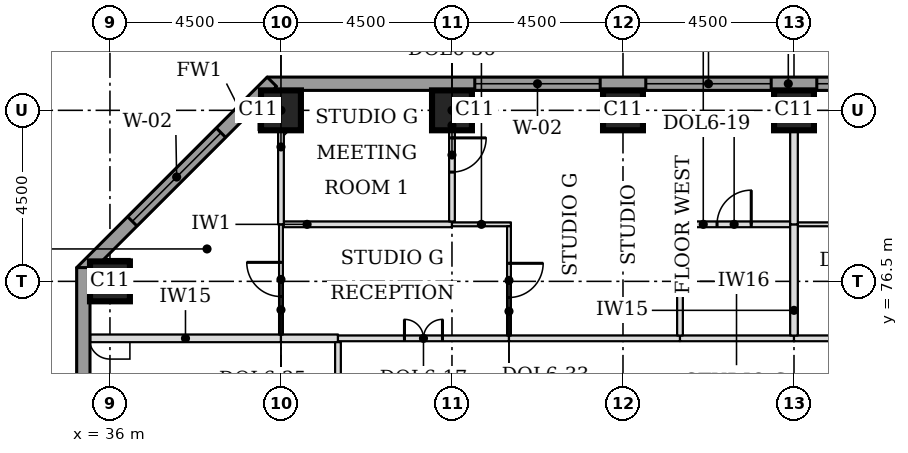
"""IFC4 building model, lengths in metres.
Left out: names, types, materials, properties, quantities, classifications, styles, units other than length and angle.
Written with IfcOpenShell. Run it as: python <this file> out.ifc"""

import sys

from ifc_helpers import new_model, si_unit, direction, frame, frame_2d, origin, origin_2d, place, context, subcontext, project, spatial, rectangle, extrude, element, fill, save


model = new_model("IFC4")
c1 = context("Model", 3, precision=1e-05, world=origin(), true_north=direction((0.0, 1.0)))
c2 = subcontext(c1, "Body", "Model", "MODEL_VIEW")
j1 = project(units=[si_unit("LENGTHUNIT", "METRE"), si_unit("PLANEANGLEUNIT", "RADIAN")], contexts=[c1])
p1 = place(None, origin())
s1 = spatial("IfcSite", under=j1, at=p1, CompositionType="ELEMENT")
p2 = place(p1, origin())
s2 = spatial("IfcBuilding", under=s1, at=p2, CompositionType="ELEMENT")
p3 = place(p2, frame((0.0, 0.0, 115.9)))
s3 = spatial("IfcBuildingStorey", under=s2, at=p3, CompositionType="ELEMENT", Elevation=115.9)
for number, where, z_axis, x_axis in (
    (1, (36.0, 76.5, 0.0), (0.0, 0.0, 1.0), (1.0, 0.0, 0.0)),
    (2, (40.5, 81.0, 0.0), (0.0, 0.0, 1.0), (1.0, 0.0, 0.0)),
    (3, (45.0, 81.0, 0.0), (0.0, 0.0, 1.0), (1.0, 0.0, 0.0)),
    (4, (49.5, 81.0, 0.0), (0.0, 0.0, 1.0), (1.0, 0.0, 0.0)),
    (5, (54.0, 81.0, 0.0), (0.0, 0.0, 1.0), (1.0, 0.0, 0.0)),
):
    element("IfcColumn", number, at=place(p3, frame(where, z_axis=z_axis, x_axis=x_axis)), inside=s3, PredefinedType="COLUMN", context=c2, shape_type="SweptSolid", body=[
        extrude(rectangle(XDim=1.05, YDim=1.05, at=origin_2d()), origin(), (0.0, 0.0, 1.0), 3.7),
    ])
p4 = place(p3, frame((72.362, 81.7, 0.0), z_axis=(0.0, 0.0, 1.0), x_axis=(-1.0, 0.0, 0.0)))
e6 = element("IfcWall", 6, at=p4, inside=s3, PredefinedType="STANDARD", context=c2, shape_type="SweptSolid", body=[
    extrude(rectangle(XDim=32.225, YDim=0.35, at=frame_2d((16.112, 0.0))), origin(), (0.0, 0.0, 1.0), 3.525),
])
p5 = place(p4, frame((5.462, 0.0, 0.9)))
e7 = element("IfcOpeningElement", 7, at=p5, cuts=e6, PredefinedType="OPENING", context=c2, shape_type="SweptSolid", body=[
    extrude(rectangle(XDim=3.3, YDim=1.9, at=frame_2d((1.65, 0.95))), frame((0.0, 0.185, 0.0), z_axis=(0.0, -1.0, 0.0), x_axis=(1.0, 0.0, 0.0)), (0.0, 0.0, 1.0), 0.37),
])
p6 = place(p4, frame((9.962, 0.0, 0.9)))
e8 = element("IfcOpeningElement", 8, at=p6, cuts=e6, PredefinedType="OPENING", context=c2, shape_type="SweptSolid", body=[
    extrude(rectangle(XDim=3.3, YDim=1.9, at=frame_2d((1.65, 0.95))), frame((0.0, 0.185, 0.0), z_axis=(0.0, -1.0, 0.0), x_axis=(1.0, 0.0, 0.0)), (0.0, 0.0, 1.0), 0.37),
])
p7 = place(p4, frame((14.462, 0.0, 0.9)))
e9 = element("IfcOpeningElement", 9, at=p7, cuts=e6, PredefinedType="OPENING", context=c2, shape_type="SweptSolid", body=[
    extrude(rectangle(XDim=3.3, YDim=1.9, at=frame_2d((1.65, 0.95))), frame((0.0, 0.185, 0.0), z_axis=(0.0, -1.0, 0.0), x_axis=(1.0, 0.0, 0.0)), (0.0, 0.0, 1.0), 0.37),
])
p8 = place(p4, frame((18.962, 0.0, 0.9)))
e10 = element("IfcOpeningElement", 10, at=p8, cuts=e6, PredefinedType="OPENING", context=c2, shape_type="SweptSolid", body=[
    extrude(rectangle(XDim=3.3, YDim=1.9, at=frame_2d((1.65, 0.95))), frame((0.0, 0.185, 0.0), z_axis=(0.0, -1.0, 0.0), x_axis=(1.0, 0.0, 0.0)), (0.0, 0.0, 1.0), 0.37),
])
p9 = place(p4, frame((23.462, 0.0, 0.9)))
e11 = element("IfcOpeningElement", 11, at=p9, cuts=e6, PredefinedType="OPENING", context=c2, shape_type="SweptSolid", body=[
    extrude(rectangle(XDim=3.3, YDim=1.9, at=frame_2d((1.65, 0.95))), frame((0.0, 0.185, 0.0), z_axis=(0.0, -1.0, 0.0), x_axis=(1.0, 0.0, 0.0)), (0.0, 0.0, 1.0), 0.37),
])
p10 = place(p3, frame((40.261, 81.751, 0.0), z_axis=(0.0, 0.0, 1.0), x_axis=(-0.707106781187, -0.707106781187, 0.0)))
e12 = element("IfcWall", 12, at=p10, inside=s3, PredefinedType="STANDARD", context=c2, shape_type="SweptSolid", body=[
    extrude(rectangle(XDim=7.089, YDim=0.35, at=frame_2d((3.544, 0.0))), origin(), (0.0, 0.0, 1.0), 3.525),
])
p11 = place(p10, frame((1.894, 0.0, 0.9)))
e13 = element("IfcOpeningElement", 13, at=p11, cuts=e12, PredefinedType="OPENING", context=c2, shape_type="SweptSolid", body=[
    extrude(rectangle(XDim=3.3, YDim=1.9, at=frame_2d((1.65, 0.95))), frame((0.0, 0.185, 0.0), z_axis=(0.0, -1.0, 0.0), x_axis=(1.0, 0.0, 0.0)), (0.0, 0.0, 1.0), 0.37),
])
p12 = place(p3, frame((35.3, 76.862, 0.0), z_axis=(0.0, 0.0, 1.0), x_axis=(0.0, -1.0, 0.0)))
e14 = element("IfcWall", 14, at=p12, inside=s3, PredefinedType="STANDARD", context=c2, shape_type="SweptSolid", body=[
    extrude(rectangle(XDim=13.337, YDim=0.35, at=frame_2d((6.669, 0.0))), origin(), (0.0, 0.0, 1.0), 3.525),
])
p13 = place(p12, frame((9.537, 0.0, 0.9)))
e15 = element("IfcOpeningElement", 15, at=p13, cuts=e14, PredefinedType="OPENING", context=c2, shape_type="SweptSolid", body=[
    extrude(rectangle(XDim=3.3, YDim=1.9, at=frame_2d((1.65, 0.95))), frame((0.0, 0.185, 0.0), z_axis=(0.0, -1.0, 0.0), x_axis=(1.0, 0.0, 0.0)), (0.0, 0.0, 1.0), 0.37),
])
p14 = place(p3, frame((35.475, 75.0, 0.0), z_axis=(0.0, 0.0, 1.0), x_axis=(1.0, 0.0, 0.0)))
e16 = element("IfcWall", 16, at=p14, inside=s3, PredefinedType="PARTITIONING", context=c2, shape_type="SweptSolid", body=[
    extrude(rectangle(XDim=5.025, YDim=0.2, at=frame_2d((2.512, 0.0))), origin(), (0.0, 0.0, 1.0), 3.55),
])
p15 = place(p3, frame((40.5, 75.0, 0.0), z_axis=(0.0, 0.0, 1.0), x_axis=(1.0, 0.0, 0.0)))
e17 = element("IfcWall", 17, at=p15, inside=s3, PredefinedType="PARTITIONING", context=c2, shape_type="SweptSolid", body=[
    extrude(rectangle(XDim=1.5, YDim=0.2, at=frame_2d((0.75, 0.0))), origin(), (0.0, 0.0, 1.0), 3.55),
])
p16 = place(p3, frame((42.0, 75.0, 0.0), z_axis=(0.0, 0.0, 1.0), x_axis=(1.0, 0.0, 0.0)))
e18 = element("IfcWall", 18, at=p16, inside=s3, PredefinedType="PARTITIONING", context=c2, shape_type="SweptSolid", body=[
    extrude(rectangle(XDim=4.5, YDim=0.15, at=frame_2d((2.25, 0.0))), origin(), (0.0, 0.0, 1.0), 3.55),
])
p17 = place(p16, frame((1.75, 0.0, 0.0)))
e19 = element("IfcOpeningElement", 19, at=p17, cuts=e18, PredefinedType="OPENING", context=c2, shape_type="SweptSolid", body=[
    extrude(rectangle(XDim=1.0, YDim=2.1, at=frame_2d((0.5, 1.05))), frame((0.0, 0.085, 0.0), z_axis=(0.0, -1.0, 0.0), x_axis=(1.0, 0.0, 0.0)), (0.0, 0.0, 1.0), 0.17),
])
p18 = place(p3, frame((46.5, 75.0, 0.0), z_axis=(0.0, 0.0, 1.0), x_axis=(1.0, 0.0, 0.0)))
e20 = element("IfcWall", 20, at=p18, inside=s3, PredefinedType="PARTITIONING", context=c2, shape_type="SweptSolid", body=[
    extrude(rectangle(XDim=4.5, YDim=0.15, at=frame_2d((2.25, 0.0))), origin(), (0.0, 0.0, 1.0), 3.55),
])
p19 = place(p3, frame((51.0, 75.0, 0.0), z_axis=(0.0, 0.0, 1.0), x_axis=(1.0, 0.0, 0.0)))
e21 = element("IfcWall", 21, at=p19, inside=s3, PredefinedType="PARTITIONING", context=c2, shape_type="SweptSolid", body=[
    extrude(rectangle(XDim=3.0, YDim=0.15, at=frame_2d((1.5, 0.0))), origin(), (0.0, 0.0, 1.0), 3.55),
])
p20 = place(p3, frame((54.0, 75.0, 0.0), z_axis=(0.0, 0.0, 1.0), x_axis=(1.0, 0.0, 0.0)))
e22 = element("IfcWall", 22, at=p20, inside=s3, PredefinedType="PARTITIONING", context=c2, shape_type="SweptSolid", body=[
    extrude(rectangle(XDim=4.5, YDim=0.15, at=frame_2d((2.25, 0.0))), origin(), (0.0, 0.0, 1.0), 3.55),
])
p21 = place(p20, frame((1.75, 0.0, 0.0)))
e23 = element("IfcOpeningElement", 23, at=p21, cuts=e22, PredefinedType="OPENING", context=c2, shape_type="SweptSolid", body=[
    extrude(rectangle(XDim=1.0, YDim=2.1, at=frame_2d((0.5, 1.05))), frame((0.0, 0.085, 0.0), z_axis=(0.0, -1.0, 0.0), x_axis=(1.0, 0.0, 0.0)), (0.0, 0.0, 1.0), 0.17),
])
p22 = place(p3, frame((40.575, 78.0, 0.0), z_axis=(0.0, 0.0, 1.0), x_axis=(1.0, 0.0, 0.0)))
e24 = element("IfcWall", 24, at=p22, inside=s3, PredefinedType="PARTITIONING", context=c2, shape_type="SweptSolid", body=[
    extrude(rectangle(XDim=4.425, YDim=0.15, at=frame_2d((2.212, 0.0))), origin(), (0.0, 0.0, 1.0), 3.55),
])
p23 = place(p3, frame((45.0, 78.0, 0.0), z_axis=(0.0, 0.0, 1.0), x_axis=(1.0, 0.0, 0.0)))
e25 = element("IfcWall", 25, at=p23, inside=s3, PredefinedType="PARTITIONING", context=c2, shape_type="SweptSolid", body=[
    extrude(rectangle(XDim=1.55, YDim=0.1, at=frame_2d((0.775, 0.0))), origin(), (0.0, 0.0, 1.0), 3.55),
])
p24 = place(p3, frame((50.925, 78.0, 0.0), z_axis=(0.0, 0.0, 1.0), x_axis=(1.0, 0.0, 0.0)))
e26 = element("IfcWall", 26, at=p24, inside=s3, PredefinedType="PARTITIONING", context=c2, shape_type="SweptSolid", body=[
    extrude(rectangle(XDim=2.975, YDim=0.15, at=frame_2d((1.487, 0.0))), origin(), (0.0, 0.0, 1.0), 3.55),
])
p25 = place(p24, frame((1.05, 0.0, 0.0)))
e27 = element("IfcOpeningElement", 27, at=p25, cuts=e26, PredefinedType="OPENING", context=c2, shape_type="SweptSolid", body=[
    extrude(rectangle(XDim=0.9, YDim=2.1, at=frame_2d((0.45, 1.05))), frame((0.0, 0.085, 0.0), z_axis=(0.0, -1.0, 0.0), x_axis=(1.0, 0.0, 0.0)), (0.0, 0.0, 1.0), 0.17),
])
p26 = place(p3, frame((54.1, 78.0, 0.0), z_axis=(0.0, 0.0, 1.0), x_axis=(1.0, 0.0, 0.0)))
e28 = element("IfcWall", 28, at=p26, inside=s3, PredefinedType="PARTITIONING", context=c2, shape_type="SweptSolid", body=[
    extrude(rectangle(XDim=4.35, YDim=0.1, at=frame_2d((2.175, 0.0))), origin(), (0.0, 0.0, 1.0), 3.55),
])
p27 = place(p26, frame((1.75, 0.0, 0.0)))
e29 = element("IfcOpeningElement", 29, at=p27, cuts=e28, PredefinedType="OPENING", context=c2, shape_type="SweptSolid", body=[
    extrude(rectangle(XDim=0.9, YDim=2.1, at=frame_2d((0.45, 1.05))), frame((0.0, 0.06, 0.0), z_axis=(0.0, -1.0, 0.0), x_axis=(1.0, 0.0, 0.0)), (0.0, 0.0, 1.0), 0.12),
])
p28 = place(p3, frame((42.0, 57.075, 0.0), z_axis=(0.0, 0.0, 1.0), x_axis=(0.0, 1.0, 0.0)))
e30 = element("IfcWall", 30, at=p28, inside=s3, PredefinedType="PARTITIONING", context=c2, shape_type="SweptSolid", body=[
    extrude(rectangle(XDim=17.825, YDim=0.15, at=frame_2d((8.913, 0.0))), origin(), (0.0, 0.0, 1.0), 3.55),
])
p29 = place(p3, frame((46.5, 75.075, 0.0), z_axis=(0.0, 0.0, 1.0), x_axis=(0.0, 1.0, 0.0)))
e31 = element("IfcWall", 31, at=p29, inside=s3, PredefinedType="PARTITIONING", context=c2, shape_type="SweptSolid", body=[
    extrude(rectangle(XDim=2.875, YDim=0.1, at=frame_2d((1.438, 0.0))), origin(), (0.0, 0.0, 1.0), 3.022),
])
p30 = place(p29, frame((1.0, 0.0, 0.0)))
e32 = element("IfcOpeningElement", 32, at=p30, cuts=e31, PredefinedType="OPENING", context=c2, shape_type="SweptSolid", body=[
    extrude(rectangle(XDim=0.9, YDim=2.1, at=frame_2d((0.45, 1.05))), frame((0.0, 0.06, 0.0), z_axis=(0.0, -1.0, 0.0), x_axis=(1.0, 0.0, 0.0)), (0.0, 0.0, 1.0), 0.12),
])
p31 = place(p3, frame((51.0, 75.075, 0.0), z_axis=(0.0, 0.0, 1.0), x_axis=(0.0, 1.0, 0.0)))
e33 = element("IfcWall", 33, at=p31, inside=s3, PredefinedType="PARTITIONING", context=c2, shape_type="SweptSolid", body=[
    extrude(rectangle(XDim=2.85, YDim=0.15, at=frame_2d((1.425, 0.0))), origin(), (0.0, 0.0, 1.0), 3.55),
])
p32 = place(p3, frame((54.0, 75.075, 0.0), z_axis=(0.0, 0.0, 1.0), x_axis=(0.0, 1.0, 0.0)))
e34 = element("IfcWall", 34, at=p32, inside=s3, PredefinedType="PARTITIONING", context=c2, shape_type="SweptSolid", body=[
    extrude(rectangle(XDim=2.925, YDim=0.2, at=frame_2d((1.462, 0.0))), origin(), (0.0, 0.0, 1.0), 3.55),
])
p33 = place(p3, frame((40.5, 75.1, 0.0), z_axis=(0.0, 0.0, 1.0), x_axis=(0.0, 1.0, 0.0)))
e35 = element("IfcWall", 35, at=p33, inside=s3, PredefinedType="PARTITIONING", context=c2, shape_type="SweptSolid", body=[
    extrude(rectangle(XDim=2.9, YDim=0.1, at=frame_2d((1.45, 0.0))), origin(), (0.0, 0.0, 1.0), 3.55),
])
p34 = place(p33, frame((1.0, 0.0, 0.0)))
e36 = element("IfcOpeningElement", 36, at=p34, cuts=e35, PredefinedType="OPENING", context=c2, shape_type="SweptSolid", body=[
    extrude(rectangle(XDim=0.9, YDim=2.1, at=frame_2d((0.45, 1.05))), frame((0.0, 0.06, 0.0), z_axis=(0.0, -1.0, 0.0), x_axis=(1.0, 0.0, 0.0)), (0.0, 0.0, 1.0), 0.12),
])
p35 = place(p3, frame((40.5, 78.0, 0.0), z_axis=(0.0, 0.0, 1.0), x_axis=(0.0, 1.0, 0.0)))
e37 = element("IfcWall", 37, at=p35, inside=s3, PredefinedType="PARTITIONING", context=c2, shape_type="SweptSolid", body=[
    extrude(rectangle(XDim=2.475, YDim=0.15, at=frame_2d((1.238, 0.0))), origin(), (0.0, 0.0, 1.0), 3.55),
])
p36 = place(p3, frame((54.0, 78.0, 0.0), z_axis=(0.0, 0.0, 1.0), x_axis=(0.0, 1.0, 0.0)))
e38 = element("IfcWall", 38, at=p36, inside=s3, PredefinedType="PARTITIONING", context=c2, shape_type="SweptSolid", body=[
    extrude(rectangle(XDim=3.525, YDim=0.2, at=frame_2d((1.762, 0.0))), origin(), (0.0, 0.0, 1.0), 3.55),
])
p37 = place(p3, frame((45.0, 78.075, 0.0), z_axis=(0.0, 0.0, 1.0), x_axis=(0.0, 1.0, 0.0)))
e39 = element("IfcWall", 39, at=p37, inside=s3, PredefinedType="PARTITIONING", context=c2, shape_type="SweptSolid", body=[
    extrude(rectangle(XDim=3.45, YDim=0.15, at=frame_2d((1.725, 0.0))), origin(), (0.0, 0.0, 1.0), 3.55),
])
p38 = place(p37, frame((1.3, 0.0, 0.0)))
e40 = element("IfcOpeningElement", 40, at=p38, cuts=e39, PredefinedType="OPENING", context=c2, shape_type="SweptSolid", body=[
    extrude(rectangle(XDim=0.9, YDim=2.1, at=frame_2d((0.45, 1.05))), frame((0.0, 0.085, 0.0), z_axis=(0.0, -1.0, 0.0), x_axis=(1.0, 0.0, 0.0)), (0.0, 0.0, 1.0), 0.17),
])
p39 = place(p7, origin())
e41 = element("IfcWindow", 41, at=p39, inside=s3, PartitioningType="SINGLE_PANEL", PredefinedType="WINDOW", context=c2, shape_type="SweptSolid", body=[
    extrude(rectangle(XDim=3.3, YDim=1.9, at=frame_2d((1.65, 0.95))), frame((0.0, 0.085, 0.0), z_axis=(0.0, -1.0, 0.0), x_axis=(1.0, 0.0, 0.0)), (0.0, 0.0, 1.0), 0.06),
])
fill(e9, e41)
p40 = place(p8, origin())
e42 = element("IfcWindow", 42, at=p40, inside=s3, PartitioningType="SINGLE_PANEL", PredefinedType="WINDOW", context=c2, shape_type="SweptSolid", body=[
    extrude(rectangle(XDim=3.3, YDim=1.9, at=frame_2d((1.65, 0.95))), frame((0.0, 0.085, 0.0), z_axis=(0.0, -1.0, 0.0), x_axis=(1.0, 0.0, 0.0)), (0.0, 0.0, 1.0), 0.06),
])
fill(e10, e42)
p41 = place(p9, origin())
e43 = element("IfcWindow", 43, at=p41, inside=s3, PartitioningType="SINGLE_PANEL", PredefinedType="WINDOW", context=c2, shape_type="SweptSolid", body=[
    extrude(rectangle(XDim=3.3, YDim=1.9, at=frame_2d((1.65, 0.95))), frame((0.0, 0.085, 0.0), z_axis=(0.0, -1.0, 0.0), x_axis=(1.0, 0.0, 0.0)), (0.0, 0.0, 1.0), 0.06),
])
fill(e11, e43)
p42 = place(p11, origin())
e44 = element("IfcWindow", 44, at=p42, inside=s3, PartitioningType="SINGLE_PANEL", PredefinedType="WINDOW", context=c2, shape_type="SweptSolid", body=[
    extrude(rectangle(XDim=3.3, YDim=1.9, at=frame_2d((1.65, 0.95))), frame((0.0, 0.085, 0.0), z_axis=(0.0, -1.0, 0.0), x_axis=(1.0, 0.0, 0.0)), (0.0, 0.0, 1.0), 0.06),
])
fill(e13, e44)
p43 = place(p17, origin())
e45 = element("IfcDoor", 45, at=p43, inside=s3, OperationType="DOUBLE_DOOR_SINGLE_SWING", PredefinedType="DOOR", context=c2, shape_type="SweptSolid", body=[
    extrude(rectangle(XDim=1.0, YDim=2.1, at=frame_2d((0.5, 1.05))), frame((0.0, 0.025, 0.0), z_axis=(0.0, -1.0, 0.0), x_axis=(1.0, 0.0, 0.0)), (0.0, 0.0, 1.0), 0.05),
])
fill(e19, e45)
p44 = place(p30, frame((0.9, 0.0, 0.0), z_axis=(0.0, 0.0, 1.0), x_axis=(-1.0, 0.0, 0.0)))
e46 = element("IfcDoor", 46, at=p44, inside=s3, OperationType="SINGLE_SWING_LEFT", PredefinedType="DOOR", context=c2, shape_type="SweptSolid", body=[
    extrude(rectangle(XDim=0.9, YDim=2.1, at=frame_2d((0.45, 1.05))), frame((0.0, 0.025, 0.0), z_axis=(0.0, -1.0, 0.0), x_axis=(1.0, 0.0, 0.0)), (0.0, 0.0, 1.0), 0.05),
])
fill(e32, e46)
p45 = place(p34, origin())
e47 = element("IfcDoor", 47, at=p45, inside=s3, OperationType="SINGLE_SWING_RIGHT", PredefinedType="DOOR", context=c2, shape_type="SweptSolid", body=[
    extrude(rectangle(XDim=0.9, YDim=2.1, at=frame_2d((0.45, 1.05))), frame((0.0, 0.025, 0.0), z_axis=(0.0, -1.0, 0.0), x_axis=(1.0, 0.0, 0.0)), (0.0, 0.0, 1.0), 0.05),
])
fill(e36, e47)
p46 = place(p25, origin())
e48 = element("IfcDoor", 48, at=p46, inside=s3, OperationType="SINGLE_SWING_RIGHT", PredefinedType="DOOR", context=c2, shape_type="SweptSolid", body=[
    extrude(rectangle(XDim=0.9, YDim=2.1, at=frame_2d((0.45, 1.05))), frame((0.0, 0.025, 0.0), z_axis=(0.0, -1.0, 0.0), x_axis=(1.0, 0.0, 0.0)), (0.0, 0.0, 1.0), 0.05),
])
fill(e27, e48)
p47 = place(p38, frame((0.9, 0.0, 0.0), z_axis=(0.0, 0.0, 1.0), x_axis=(-1.0, 0.0, 0.0)))
e49 = element("IfcDoor", 49, at=p47, inside=s3, OperationType="SINGLE_SWING_LEFT", PredefinedType="DOOR", context=c2, shape_type="SweptSolid", body=[
    extrude(rectangle(XDim=0.9, YDim=2.1, at=frame_2d((0.45, 1.05))), frame((0.0, 0.025, 0.0), z_axis=(0.0, -1.0, 0.0), x_axis=(1.0, 0.0, 0.0)), (0.0, 0.0, 1.0), 0.05),
])
fill(e40, e49)
save(model, sys.argv[1])
